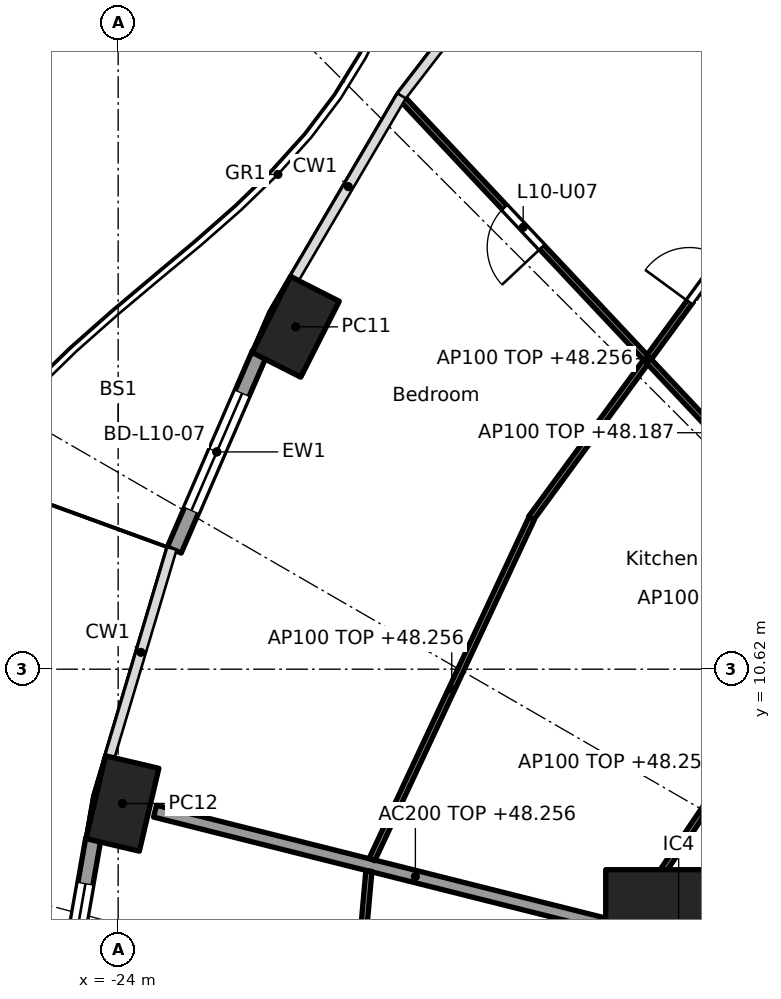
"""IFC4 building model, lengths in metres.
Left out: names, types, materials, properties, quantities, classifications, styles, units other than length and angle.
Written with IfcOpenShell. Run it as: python <this file> out.ifc"""

import sys

from ifc_helpers import new_model, si_unit, direction, frame, frame_2d, origin, origin_2d, place, context, subcontext, project, spatial, rectangle, hollow_rectangle, extrude, element, fill, save


model = new_model("IFC4")
c1 = context("Model", 3, precision=1e-05, world=origin(), true_north=direction((0.0, 1.0)))
c2 = subcontext(c1, "Body", "Model", "MODEL_VIEW")
j1 = project(units=[si_unit("LENGTHUNIT", "METRE"), si_unit("PLANEANGLEUNIT", "RADIAN")], contexts=[c1])
p1 = place(None, origin())
s1 = spatial("IfcSite", under=j1, at=p1, CompositionType="ELEMENT")
p2 = place(p1, origin())
s2 = spatial("IfcBuilding", under=s1, at=p2, CompositionType="ELEMENT")
p3 = place(p2, frame((0.0, 0.0, 45.5)))
s3 = spatial("IfcBuildingStorey", under=s2, at=p3, CompositionType="ELEMENT", Elevation=45.5)
for number, where, z_axis, x_axis in (
    (1, (-21.082, 16.25, 0.0), (0.0, 0.0, 1.0), (-0.452, -0.892, 0.0)),
    (2, (-23.929, 8.412, 0.0), (0.0, 0.0, 1.0), (-0.229, -0.973, 0.0)),
):
    element("IfcColumn", number, at=place(p3, frame(where, z_axis=z_axis, x_axis=x_axis)), inside=s3, PredefinedType="COLUMN", context=c2, shape_type="SweptSolid", body=[
        extrude(hollow_rectangle(XDim=1.4, YDim=0.9, WallThickness=0.05, at=origin_2d()), origin(), (0.0, 0.0, 1.0), 3.7),
    ])
p4 = place(p3, frame((-14.782, 6.123, 0.0), z_axis=(0.0, 0.0, 1.0), x_axis=(1.0, 0.0, 0.0)))
e3 = element("IfcColumn", 3, at=p4, inside=s3, PredefinedType="COLUMN", context=c2, shape_type="SweptSolid", body=[
    extrude(rectangle(XDim=2.4, YDim=2.4, at=origin_2d()), origin(), (0.0, 0.0, 1.0), 3.7),
])
p5 = place(p3, frame((-23.078, 12.579, 0.0), z_axis=(0.0, 0.0, 1.0), x_axis=(0.397624958345, 0.917548032803, 0.0)))
e4 = element("IfcWall", 4, at=p5, inside=s3, PredefinedType="SOLIDWALL", context=c2, shape_type="SweptSolid", body=[
    extrude(rectangle(XDim=3.52, YDim=0.25, at=frame_2d((1.76, 0.0))), origin(), (0.0, 0.0, 1.0), 3.44),
])
p6 = place(p5, frame((0.71, 0.0, 0.0)))
e5 = element("IfcOpeningElement", 5, at=p6, cuts=e4, PredefinedType="OPENING", context=c2, shape_type="SweptSolid", body=[
    extrude(rectangle(XDim=2.1, YDim=2.4, at=frame_2d((1.05, 1.2))), frame((0.0, 0.135, 0.0), z_axis=(0.0, -1.0, 0.0), x_axis=(1.0, 0.0, 0.0)), (0.0, 0.0, 1.0), 0.27),
])
p7 = place(p3, frame((-25.029, 4.286, 0.0), z_axis=(0.0, 0.0, 1.0), x_axis=(0.172217377323, 0.98505897029, 0.0)))
e6 = element("IfcWall", 6, at=p7, inside=s3, PredefinedType="SOLIDWALL", context=c2, shape_type="SweptSolid", body=[
    extrude(rectangle(XDim=3.598, YDim=0.25, at=frame_2d((1.799, 0.0))), origin(), (0.0, 0.0, 1.0), 3.44),
])
p8 = place(p7, frame((0.749, 0.0, 0.0)))
e7 = element("IfcOpeningElement", 7, at=p8, cuts=e6, PredefinedType="OPENING", context=c2, shape_type="SweptSolid", body=[
    extrude(rectangle(XDim=2.1, YDim=2.4, at=frame_2d((1.05, 1.2))), frame((0.0, 0.135, 0.0), z_axis=(0.0, -1.0, 0.0), x_axis=(1.0, 0.0, 0.0)), (0.0, 0.0, 1.0), 0.27),
])
p9 = place(p3, frame((-14.831, 6.135, 0.0), z_axis=(0.0, 0.0, 1.0), x_axis=(-0.969884949569, 0.243563512454, 0.0)))
e8 = element("IfcWall", 8, at=p9, inside=s3, PredefinedType="PARTITIONING", context=c2, shape_type="SweptSolid", body=[
    extrude(rectangle(XDim=8.829, YDim=0.2, at=frame_2d((4.415, 0.0))), origin(), (0.0, 0.0, 1.0), 2.756),
])
p10 = place(p3, frame((-13.362, 18.35, 0.0), z_axis=(0.0, 0.0, 1.0), x_axis=(-0.591191311491, -0.806531359104, 0.0)))
e9 = element("IfcWall", 9, at=p10, inside=s3, PredefinedType="PARTITIONING", context=c2, shape_type="SweptSolid", body=[
    extrude(rectangle(XDim=6.51, YDim=0.1, at=frame_2d((3.255, 0.0))), origin(), (0.0, 0.0, 1.0), 2.756),
])
p11 = place(p10, frame((1.202, 0.0, 0.0)))
e10 = element("IfcOpeningElement", 10, at=p11, cuts=e9, PredefinedType="OPENING", context=c2, shape_type="SweptSolid", body=[
    extrude(rectangle(XDim=0.9, YDim=2.1, at=frame_2d((0.45, 1.05))), frame((0.0, 0.06, 0.0), z_axis=(0.0, -1.0, 0.0), x_axis=(1.0, 0.0, 0.0)), (0.0, 0.0, 1.0), 0.12),
])
p12 = place(p3, frame((-8.953, 8.958, 0.0), z_axis=(0.0, 0.0, 1.0), x_axis=(-0.684574307023, 0.728943082939, 0.0)))
e11 = element("IfcWall", 11, at=p12, inside=s3, PredefinedType="PARTITIONING", context=c2, shape_type="SweptSolid", body=[
    extrude(rectangle(XDim=15.231, YDim=0.1, at=frame_2d((7.615, 0.0))), origin(), (0.0, 0.0, 1.0), 2.687),
])
p13 = place(p12, frame((1.54, 0.0, 0.0)))
e12 = element("IfcOpeningElement", 12, at=p13, cuts=e11, PredefinedType="OPENING", context=c2, shape_type="SweptSolid", body=[
    extrude(rectangle(XDim=0.9, YDim=2.1, at=frame_2d((0.45, 1.05))), frame((0.0, 0.06, 0.0), z_axis=(0.0, -1.0, 0.0), x_axis=(1.0, 0.0, 0.0)), (0.0, 0.0, 1.0), 0.12),
])
p14 = place(p12, frame((6.174, 0.0, 0.0)))
e13 = element("IfcOpeningElement", 13, at=p14, cuts=e11, PredefinedType="OPENING", context=c2, shape_type="SweptSolid", body=[
    extrude(rectangle(XDim=0.9, YDim=2.1, at=frame_2d((0.45, 1.05))), frame((0.0, 0.06, 0.0), z_axis=(0.0, -1.0, 0.0), x_axis=(1.0, 0.0, 0.0)), (0.0, 0.0, 1.0), 0.12),
])
p15 = place(p12, frame((11.8, 0.0, 0.0)))
e14 = element("IfcOpeningElement", 14, at=p15, cuts=e11, PredefinedType="OPENING", context=c2, shape_type="SweptSolid", body=[
    extrude(rectangle(XDim=0.9, YDim=2.1, at=frame_2d((0.45, 1.05))), frame((0.0, 0.06, 0.0), z_axis=(0.0, -1.0, 0.0), x_axis=(1.0, 0.0, 0.0)), (0.0, 0.0, 1.0), 0.12),
])
p16 = place(p3, frame((-13.162, 10.087, 0.0), z_axis=(0.0, 0.0, 1.0), x_axis=(-0.55912750241, -0.829081682375, 0.0)))
e15 = element("IfcWall", 15, at=p16, inside=s3, PredefinedType="PARTITIONING", context=c2, shape_type="SweptSolid", body=[
    extrude(rectangle(XDim=4.408, YDim=0.1, at=frame_2d((2.204, 0.0))), origin(), (0.0, 0.0, 1.0), 2.756),
])
p17 = place(p3, frame((-17.203, 13.095, 0.0), z_axis=(0.0, 0.0, 1.0), x_axis=(-0.423926333401, -0.905696673202, 0.0)))
e16 = element("IfcWall", 16, at=p17, inside=s3, PredefinedType="PARTITIONING", context=c2, shape_type="SweptSolid", body=[
    extrude(rectangle(XDim=6.188, YDim=0.1, at=frame_2d((3.094, 0.0))), origin(), (0.0, 0.0, 1.0), 2.756),
])
p18 = place(p3, frame((-19.877, 7.301, 0.0), z_axis=(0.0, 0.0, 1.0), x_axis=(-0.088143415068, -0.996107794558, 0.0)))
e17 = element("IfcWall", 17, at=p18, inside=s3, PredefinedType="PARTITIONING", context=c2, shape_type="SweptSolid", body=[
    extrude(rectangle(XDim=7.279, YDim=0.1, at=frame_2d((3.64, 0.0))), origin(), (0.0, 0.0, 1.0), 2.756),
])
p19 = place(p6, origin())
e18 = element("IfcDoor", 18, at=p19, inside=s3, OperationType="SLIDING_TO_LEFT", PredefinedType="DOOR", context=c2, shape_type="SweptSolid", body=[
    extrude(rectangle(XDim=2.1, YDim=2.4, at=frame_2d((1.05, 1.2))), frame((0.0, 0.025, 0.0), z_axis=(0.0, -1.0, 0.0), x_axis=(1.0, 0.0, 0.0)), (0.0, 0.0, 1.0), 0.05),
])
fill(e5, e18)
p20 = place(p8, origin())
e19 = element("IfcDoor", 19, at=p20, inside=s3, OperationType="SLIDING_TO_LEFT", PredefinedType="DOOR", context=c2, shape_type="SweptSolid", body=[
    extrude(rectangle(XDim=2.1, YDim=2.4, at=frame_2d((1.05, 1.2))), frame((0.0, 0.025, 0.0), z_axis=(0.0, -1.0, 0.0), x_axis=(1.0, 0.0, 0.0)), (0.0, 0.0, 1.0), 0.05),
])
fill(e7, e19)
p21 = place(p11, frame((0.9, 0.0, 0.0), x_axis=(-1.0, 0.0, 0.0)))
e20 = element("IfcDoor", 20, at=p21, inside=s3, OperationType="SINGLE_SWING_LEFT", PredefinedType="DOOR", context=c2, shape_type="SweptSolid", body=[
    extrude(rectangle(XDim=0.9, YDim=2.1, at=frame_2d((0.45, 1.05))), frame((0.0, 0.025, 0.0), z_axis=(0.0, -1.0, 0.0), x_axis=(1.0, 0.0, 0.0)), (0.0, 0.0, 1.0), 0.05),
])
fill(e10, e20)
p22 = place(p15, origin())
e21 = element("IfcDoor", 21, at=p22, inside=s3, OperationType="SINGLE_SWING_LEFT", PredefinedType="DOOR", context=c2, shape_type="SweptSolid", body=[
    extrude(rectangle(XDim=0.9, YDim=2.1, at=frame_2d((0.45, 1.05))), frame((0.0, 0.025, 0.0), z_axis=(0.0, -1.0, 0.0), x_axis=(1.0, 0.0, 0.0)), (0.0, 0.0, 1.0), 0.05),
])
fill(e14, e21)
save(model, sys.argv[1])
